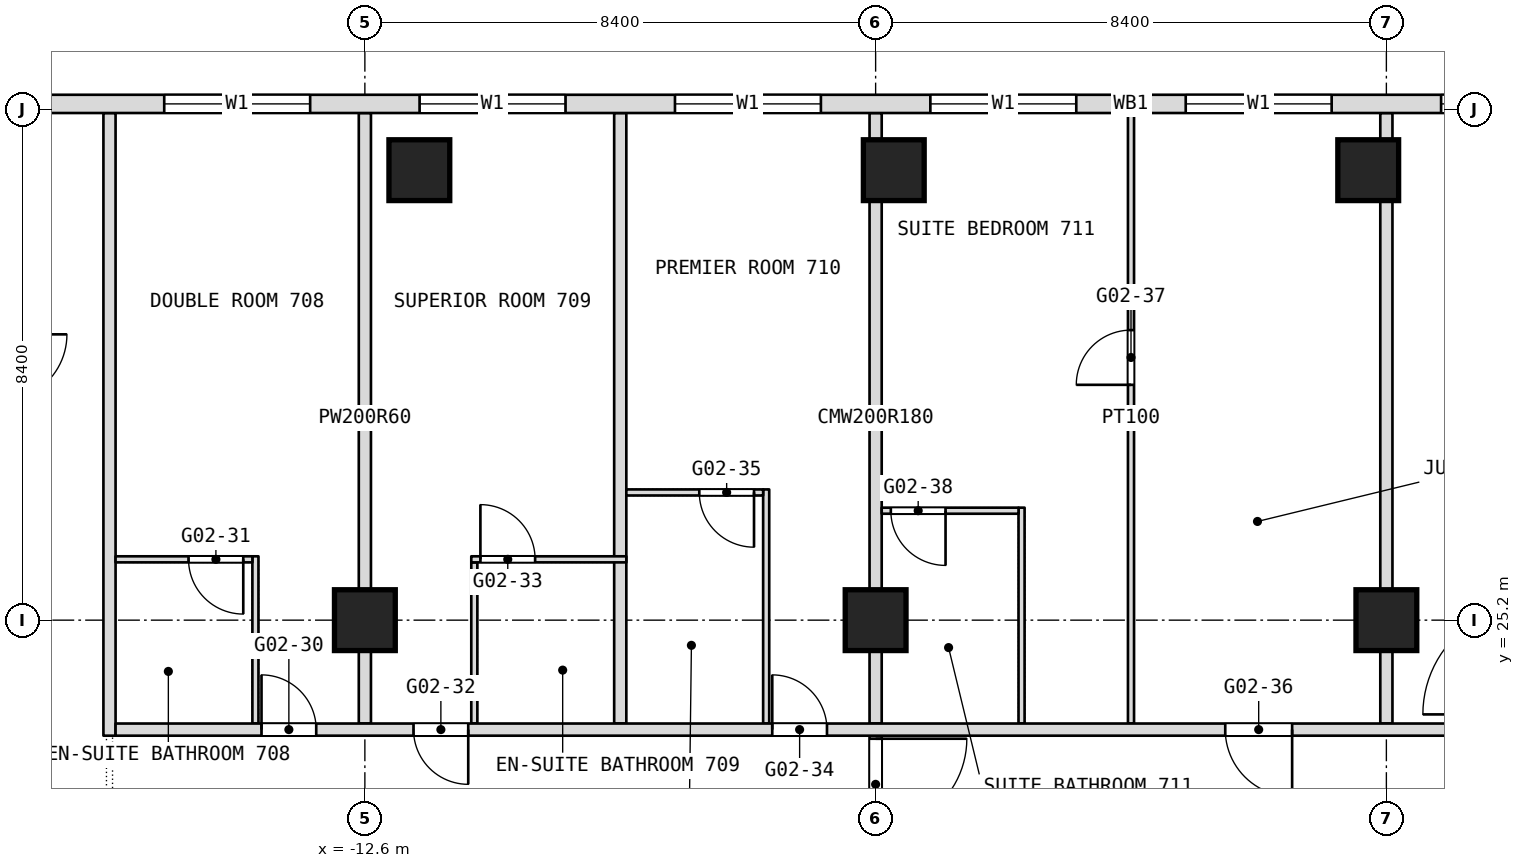
"""IFC4 building model, lengths in metres.
Left out: names, types, materials, properties, quantities, classifications, styles, units other than length and angle.
Written with IfcOpenShell. Run it as: python <this file> out.ifc"""

import sys

from ifc_helpers import new_model, si_unit, direction, frame, frame_2d, origin, origin_2d, place, context, subcontext, project, spatial, rectangle, extrude, element, fill, save


model = new_model("IFC4")
c1 = context("Model", 3, precision=1e-05, world=origin(), true_north=direction((0.0, 1.0)))
c2 = subcontext(c1, "Body", "Model", "MODEL_VIEW")
j1 = project(units=[si_unit("LENGTHUNIT", "METRE"), si_unit("PLANEANGLEUNIT", "RADIAN")], contexts=[c1])
p1 = place(None, origin())
s1 = spatial("IfcSite", under=j1, at=p1, CompositionType="ELEMENT")
p2 = place(p1, origin())
s2 = spatial("IfcBuilding", under=s1, at=p2, CompositionType="ELEMENT")
p3 = place(p2, frame((0.0, 0.0, 40.1)))
s3 = spatial("IfcBuildingStorey", under=s2, at=p3, CompositionType="ELEMENT", Elevation=40.1)
for number, where, z_axis, x_axis in (
    (1, (-12.6, 25.2, 0.0), (0.0, 0.0, 1.0), (1.0, 0.0, 0.0)),
    (2, (-4.2, 25.2, 0.0), (0.0, 0.0, 1.0), (1.0, 0.0, 0.0)),
    (3, (4.2, 25.2, 0.0), (0.0, 0.0, 1.0), (1.0, 0.0, 0.0)),
    (4, (-11.704, 32.6, 0.0), (0.0, 0.0, 1.0), (1.0, 0.0, 0.0)),
    (5, (-3.901, 32.6, 0.0), (0.0, 0.0, 1.0), (1.0, 0.0, 0.0)),
    (6, (3.901, 32.6, 0.0), (0.0, 0.0, 1.0), (1.0, 0.0, 0.0)),
):
    element("IfcColumn", number, at=place(p3, frame(where, z_axis=z_axis, x_axis=x_axis)), inside=s3, PredefinedType="COLUMN", context=c2, shape_type="SweptSolid", body=[
        extrude(rectangle(XDim=1.0, YDim=1.0, at=origin_2d()), origin(), (0.0, 0.0, 1.0), 3.6),
    ])
p4 = place(p3, frame((4.2, 23.5, 0.0), z_axis=(0.0, 0.0, 1.0), x_axis=(0.0, 1.0, 0.0)))
e7 = element("IfcWall", 7, at=p4, inside=s3, PredefinedType="PARTITIONING", context=c2, shape_type="SweptSolid", body=[
    extrude(rectangle(XDim=10.04, YDim=0.2, at=frame_2d((5.02, 0.0))), origin(), (0.0, 0.0, 1.0), 3.34),
])
p5 = place(p3, frame((0.0, 23.5, 0.0), z_axis=(0.0, 0.0, 1.0), x_axis=(0.0, 1.0, 0.0)))
e8 = element("IfcWall", 8, at=p5, inside=s3, PredefinedType="PARTITIONING", context=c2, shape_type="SweptSolid", body=[
    extrude(rectangle(XDim=10.04, YDim=0.1, at=frame_2d((5.02, 0.0))), origin(), (0.0, 0.0, 1.0), 3.34),
])
p6 = place(p5, frame((5.57, 0.0, 0.0)))
e9 = element("IfcOpeningElement", 9, at=p6, cuts=e8, PredefinedType="OPENING", context=c2, shape_type="SweptSolid", body=[
    extrude(rectangle(XDim=0.9, YDim=2.1, at=frame_2d((0.45, 1.05))), frame((0.0, 0.05, 0.0), z_axis=(0.0, -1.0, 0.0), x_axis=(1.0, 0.0, 0.0)), (0.0, 0.0, 1.0), 0.1),
])
p7 = place(p3, frame((-1.8, 23.5, 0.0), z_axis=(0.0, 0.0, 1.0), x_axis=(0.0, 1.0, 0.0)))
e10 = element("IfcWall", 10, at=p7, inside=s3, PredefinedType="PARTITIONING", context=c2, shape_type="SweptSolid", body=[
    extrude(rectangle(XDim=3.55, YDim=0.1, at=frame_2d((1.775, 0.0))), origin(), (0.0, 0.0, 1.0), 3.34),
])
p8 = place(p3, frame((-4.2, 16.8, 0.0), z_axis=(0.0, 0.0, 1.0), x_axis=(0.0, 1.0, 0.0)))
e11 = element("IfcWall", 11, at=p8, inside=s3, PredefinedType="PARTITIONING", context=c2, shape_type="SweptSolid", body=[
    extrude(rectangle(XDim=6.7, YDim=0.2, at=frame_2d((3.35, 0.0))), origin(), (0.0, 0.0, 1.0), 3.34),
])
p9 = place(p8, frame((0.15, 0.0, 0.0)))
e12 = element("IfcOpeningElement", 12, at=p9, cuts=e11, PredefinedType="OPENING", context=c2, shape_type="SweptSolid", body=[
    extrude(rectangle(XDim=1.5, YDim=2.1, at=frame_2d((0.75, 1.05))), frame((0.0, 0.1, 0.0), z_axis=(0.0, -1.0, 0.0), x_axis=(1.0, 0.0, 0.0)), (0.0, 0.0, 1.0), 0.2),
])
p10 = place(p8, frame((4.95, 0.0, 0.0)))
e13 = element("IfcOpeningElement", 13, at=p10, cuts=e11, PredefinedType="OPENING", context=c2, shape_type="SweptSolid", body=[
    extrude(rectangle(XDim=1.5, YDim=2.1, at=frame_2d((0.75, 1.05))), frame((0.0, 0.1, 0.0), z_axis=(0.0, -1.0, 0.0), x_axis=(1.0, 0.0, 0.0)), (0.0, 0.0, 1.0), 0.2),
])
p11 = place(p3, frame((-4.2, 23.5, 0.0), z_axis=(0.0, 0.0, 1.0), x_axis=(0.0, 1.0, 0.0)))
e14 = element("IfcWall", 14, at=p11, inside=s3, PredefinedType="PARTITIONING", context=c2, shape_type="SweptSolid", body=[
    extrude(rectangle(XDim=10.04, YDim=0.2, at=frame_2d((5.02, 0.0))), origin(), (0.0, 0.0, 1.0), 3.34),
])
p12 = place(p3, frame((-6.0, 23.5, 0.0), z_axis=(0.0, 0.0, 1.0), x_axis=(0.0, 1.0, 0.0)))
e15 = element("IfcWall", 15, at=p12, inside=s3, PredefinedType="PARTITIONING", context=c2, shape_type="SweptSolid", body=[
    extrude(rectangle(XDim=3.85, YDim=0.1, at=frame_2d((1.925, 0.0))), origin(), (0.0, 0.0, 1.0), 3.34),
])
p13 = place(p3, frame((-8.4, 23.5, 0.0), z_axis=(0.0, 0.0, 1.0), x_axis=(0.0, 1.0, 0.0)))
e16 = element("IfcWall", 16, at=p13, inside=s3, PredefinedType="PARTITIONING", context=c2, shape_type="SweptSolid", body=[
    extrude(rectangle(XDim=10.04, YDim=0.2, at=frame_2d((5.02, 0.0))), origin(), (0.0, 0.0, 1.0), 3.34),
])
p14 = place(p3, frame((-10.8, 23.5, 0.0), z_axis=(0.0, 0.0, 1.0), x_axis=(0.0, 1.0, 0.0)))
e17 = element("IfcWall", 17, at=p14, inside=s3, PredefinedType="PARTITIONING", context=c2, shape_type="SweptSolid", body=[
    extrude(rectangle(XDim=2.65, YDim=0.1, at=frame_2d((1.325, 0.0))), origin(), (0.0, 0.0, 1.0), 3.34),
])
p15 = place(p3, frame((-12.6, 23.5, 0.0), z_axis=(0.0, 0.0, 1.0), x_axis=(0.0, 1.0, 0.0)))
e18 = element("IfcWall", 18, at=p15, inside=s3, PredefinedType="PARTITIONING", context=c2, shape_type="SweptSolid", body=[
    extrude(rectangle(XDim=10.04, YDim=0.2, at=frame_2d((5.02, 0.0))), origin(), (0.0, 0.0, 1.0), 3.34),
])
p16 = place(p3, frame((-14.4, 23.5, 0.0), z_axis=(0.0, 0.0, 1.0), x_axis=(0.0, 1.0, 0.0)))
e19 = element("IfcWall", 19, at=p16, inside=s3, PredefinedType="PARTITIONING", context=c2, shape_type="SweptSolid", body=[
    extrude(rectangle(XDim=2.75, YDim=0.1, at=frame_2d((1.375, 0.0))), origin(), (0.0, 0.0, 1.0), 3.34),
])
p17 = place(p3, frame((-16.8, 23.3, 0.0), z_axis=(0.0, 0.0, 1.0), x_axis=(0.0, 1.0, 0.0)))
e20 = element("IfcWall", 20, at=p17, inside=s3, PredefinedType="PARTITIONING", context=c2, shape_type="SweptSolid", body=[
    extrude(rectangle(XDim=10.24, YDim=0.2, at=frame_2d((5.12, 0.0))), origin(), (0.0, 0.0, 1.0), 3.34),
])
p18 = place(p3, frame((-16.7, 23.4, 0.0), z_axis=(0.0, 0.0, 1.0), x_axis=(1.0, 0.0, 0.0)))
e21 = element("IfcWall", 21, at=p18, inside=s3, PredefinedType="PARTITIONING", context=c2, shape_type="SweptSolid", body=[
    extrude(rectangle(XDim=23.4, YDim=0.2, at=frame_2d((11.7, 0.0))), origin(), (0.0, 0.0, 1.0), 3.34),
])
p19 = place(p18, frame((2.4, 0.0, 0.0)))
e22 = element("IfcOpeningElement", 22, at=p19, cuts=e21, PredefinedType="OPENING", context=c2, shape_type="SweptSolid", body=[
    extrude(rectangle(XDim=0.9, YDim=2.1, at=frame_2d((0.45, 1.05))), frame((0.0, 0.1, 0.0), z_axis=(0.0, -1.0, 0.0), x_axis=(1.0, 0.0, 0.0)), (0.0, 0.0, 1.0), 0.2),
])
p20 = place(p18, frame((4.9, 0.0, 0.0)))
e23 = element("IfcOpeningElement", 23, at=p20, cuts=e21, PredefinedType="OPENING", context=c2, shape_type="SweptSolid", body=[
    extrude(rectangle(XDim=0.9, YDim=2.1, at=frame_2d((0.45, 1.05))), frame((0.0, 0.1, 0.0), z_axis=(0.0, -1.0, 0.0), x_axis=(1.0, 0.0, 0.0)), (0.0, 0.0, 1.0), 0.2),
])
p21 = place(p18, frame((10.8, 0.0, 0.0)))
e24 = element("IfcOpeningElement", 24, at=p21, cuts=e21, PredefinedType="OPENING", context=c2, shape_type="SweptSolid", body=[
    extrude(rectangle(XDim=0.9, YDim=2.1, at=frame_2d((0.45, 1.05))), frame((0.0, 0.1, 0.0), z_axis=(0.0, -1.0, 0.0), x_axis=(1.0, 0.0, 0.0)), (0.0, 0.0, 1.0), 0.2),
])
p22 = place(p18, frame((18.25, 0.0, 0.0)))
e25 = element("IfcOpeningElement", 25, at=p22, cuts=e21, PredefinedType="OPENING", context=c2, shape_type="SweptSolid", body=[
    extrude(rectangle(XDim=1.1, YDim=2.1, at=frame_2d((0.55, 1.05))), frame((0.0, 0.1, 0.0), z_axis=(0.0, -1.0, 0.0), x_axis=(1.0, 0.0, 0.0)), (0.0, 0.0, 1.0), 0.2),
])
p23 = place(p3, frame((-16.7, 26.2, 0.0), z_axis=(0.0, 0.0, 1.0), x_axis=(1.0, 0.0, 0.0)))
e26 = element("IfcWall", 26, at=p23, inside=s3, PredefinedType="PARTITIONING", context=c2, shape_type="SweptSolid", body=[
    extrude(rectangle(XDim=2.25, YDim=0.1, at=frame_2d((1.125, 0.0))), origin(), (0.0, 0.0, 1.0), 3.34),
])
p24 = place(p23, frame((1.2, 0.0, 0.0)))
e27 = element("IfcOpeningElement", 27, at=p24, cuts=e26, PredefinedType="OPENING", context=c2, shape_type="SweptSolid", body=[
    extrude(rectangle(XDim=0.9, YDim=2.1, at=frame_2d((0.45, 1.05))), frame((0.0, 0.05, 0.0), z_axis=(0.0, -1.0, 0.0), x_axis=(1.0, 0.0, 0.0)), (0.0, 0.0, 1.0), 0.1),
])
p25 = place(p3, frame((-10.85, 26.2, 0.0), z_axis=(0.0, 0.0, 1.0), x_axis=(1.0, 0.0, 0.0)))
e28 = element("IfcWall", 28, at=p25, inside=s3, PredefinedType="PARTITIONING", context=c2, shape_type="SweptSolid", body=[
    extrude(rectangle(XDim=2.55, YDim=0.1, at=frame_2d((1.275, 0.0))), origin(), (0.0, 0.0, 1.0), 3.34),
])
p26 = place(p25, frame((0.15, 0.0, 0.0)))
e29 = element("IfcOpeningElement", 29, at=p26, cuts=e28, PredefinedType="OPENING", context=c2, shape_type="SweptSolid", body=[
    extrude(rectangle(XDim=0.9, YDim=2.1, at=frame_2d((0.45, 1.05))), frame((0.0, 0.05, 0.0), z_axis=(0.0, -1.0, 0.0), x_axis=(1.0, 0.0, 0.0)), (0.0, 0.0, 1.0), 0.1),
])
p27 = place(p3, frame((-4.1, 27.0, 0.0), z_axis=(0.0, 0.0, 1.0), x_axis=(1.0, 0.0, 0.0)))
e30 = element("IfcWall", 30, at=p27, inside=s3, PredefinedType="PARTITIONING", context=c2, shape_type="SweptSolid", body=[
    extrude(rectangle(XDim=2.25, YDim=0.1, at=frame_2d((1.125, 0.0))), origin(), (0.0, 0.0, 1.0), 3.34),
])
p28 = place(p27, frame((0.15, 0.0, 0.0)))
e31 = element("IfcOpeningElement", 31, at=p28, cuts=e30, PredefinedType="OPENING", context=c2, shape_type="SweptSolid", body=[
    extrude(rectangle(XDim=0.9, YDim=2.1, at=frame_2d((0.45, 1.05))), frame((0.0, 0.05, 0.0), z_axis=(0.0, -1.0, 0.0), x_axis=(1.0, 0.0, 0.0)), (0.0, 0.0, 1.0), 0.1),
])
p29 = place(p3, frame((-8.3, 27.3, 0.0), z_axis=(0.0, 0.0, 1.0), x_axis=(1.0, 0.0, 0.0)))
e32 = element("IfcWall", 32, at=p29, inside=s3, PredefinedType="PARTITIONING", context=c2, shape_type="SweptSolid", body=[
    extrude(rectangle(XDim=2.25, YDim=0.1, at=frame_2d((1.125, 0.0))), origin(), (0.0, 0.0, 1.0), 3.34),
])
p30 = place(p29, frame((1.2, 0.0, 0.0)))
e33 = element("IfcOpeningElement", 33, at=p30, cuts=e32, PredefinedType="OPENING", context=c2, shape_type="SweptSolid", body=[
    extrude(rectangle(XDim=0.9, YDim=2.1, at=frame_2d((0.45, 1.05))), frame((0.0, 0.05, 0.0), z_axis=(0.0, -1.0, 0.0), x_axis=(1.0, 0.0, 0.0)), (0.0, 0.0, 1.0), 0.1),
])
p31 = place(p3, frame((23.406, 33.69, 0.0), z_axis=(0.0, 0.0, 1.0), x_axis=(-1.0, 0.0, 0.0)))
e34 = element("IfcWall", 34, at=p31, inside=s3, PredefinedType="NOTDEFINED", context=c2, shape_type="SweptSolid", body=[
    extrude(rectangle(XDim=46.812, YDim=0.3, at=frame_2d((23.406, 0.0))), origin(), (0.0, 0.0, 1.0), 3.6),
])
p32 = place(p31, frame((2.186, 0.0, 0.9)))
e35 = element("IfcOpeningElement", 35, at=p32, cuts=e34, PredefinedType="OPENING", context=c2, shape_type="SweptSolid", body=[
    extrude(rectangle(XDim=2.4, YDim=2.1, at=frame_2d((1.2, 1.05))), frame((0.0, 0.15, 0.0), z_axis=(0.0, -1.0, 0.0), x_axis=(1.0, 0.0, 0.0)), (0.0, 0.0, 1.0), 0.3),
])
p33 = place(p31, frame((7.506, 0.0, 0.9)))
e36 = element("IfcOpeningElement", 36, at=p33, cuts=e34, PredefinedType="OPENING", context=c2, shape_type="SweptSolid", body=[
    extrude(rectangle(XDim=2.4, YDim=2.1, at=frame_2d((1.2, 1.05))), frame((0.0, 0.15, 0.0), z_axis=(0.0, -1.0, 0.0), x_axis=(1.0, 0.0, 0.0)), (0.0, 0.0, 1.0), 0.3),
])
p34 = place(p31, frame((11.706, 0.0, 0.9)))
e37 = element("IfcOpeningElement", 37, at=p34, cuts=e34, PredefinedType="OPENING", context=c2, shape_type="SweptSolid", body=[
    extrude(rectangle(XDim=2.4, YDim=2.1, at=frame_2d((1.2, 1.05))), frame((0.0, 0.15, 0.0), z_axis=(0.0, -1.0, 0.0), x_axis=(1.0, 0.0, 0.0)), (0.0, 0.0, 1.0), 0.3),
])
p35 = place(p31, frame((15.906, 0.0, 0.9)))
e38 = element("IfcOpeningElement", 38, at=p35, cuts=e34, PredefinedType="OPENING", context=c2, shape_type="SweptSolid", body=[
    extrude(rectangle(XDim=2.4, YDim=2.1, at=frame_2d((1.2, 1.05))), frame((0.0, 0.15, 0.0), z_axis=(0.0, -1.0, 0.0), x_axis=(1.0, 0.0, 0.0)), (0.0, 0.0, 1.0), 0.3),
])
p36 = place(p31, frame((20.106, 0.0, 0.9)))
e39 = element("IfcOpeningElement", 39, at=p36, cuts=e34, PredefinedType="OPENING", context=c2, shape_type="SweptSolid", body=[
    extrude(rectangle(XDim=2.4, YDim=2.1, at=frame_2d((1.2, 1.05))), frame((0.0, 0.15, 0.0), z_axis=(0.0, -1.0, 0.0), x_axis=(1.0, 0.0, 0.0)), (0.0, 0.0, 1.0), 0.3),
])
p37 = place(p31, frame((24.306, 0.0, 0.9)))
e40 = element("IfcOpeningElement", 40, at=p37, cuts=e34, PredefinedType="OPENING", context=c2, shape_type="SweptSolid", body=[
    extrude(rectangle(XDim=2.4, YDim=2.1, at=frame_2d((1.2, 1.05))), frame((0.0, 0.15, 0.0), z_axis=(0.0, -1.0, 0.0), x_axis=(1.0, 0.0, 0.0)), (0.0, 0.0, 1.0), 0.3),
])
p38 = place(p31, frame((28.506, 0.0, 0.9)))
e41 = element("IfcOpeningElement", 41, at=p38, cuts=e34, PredefinedType="OPENING", context=c2, shape_type="SweptSolid", body=[
    extrude(rectangle(XDim=2.4, YDim=2.1, at=frame_2d((1.2, 1.05))), frame((0.0, 0.15, 0.0), z_axis=(0.0, -1.0, 0.0), x_axis=(1.0, 0.0, 0.0)), (0.0, 0.0, 1.0), 0.3),
])
p39 = place(p31, frame((32.706, 0.0, 0.9)))
e42 = element("IfcOpeningElement", 42, at=p39, cuts=e34, PredefinedType="OPENING", context=c2, shape_type="SweptSolid", body=[
    extrude(rectangle(XDim=2.4, YDim=2.1, at=frame_2d((1.2, 1.05))), frame((0.0, 0.15, 0.0), z_axis=(0.0, -1.0, 0.0), x_axis=(1.0, 0.0, 0.0)), (0.0, 0.0, 1.0), 0.3),
])
p40 = place(p31, frame((36.906, 0.0, 0.9)))
e43 = element("IfcOpeningElement", 43, at=p40, cuts=e34, PredefinedType="OPENING", context=c2, shape_type="SweptSolid", body=[
    extrude(rectangle(XDim=2.4, YDim=2.1, at=frame_2d((1.2, 1.05))), frame((0.0, 0.15, 0.0), z_axis=(0.0, -1.0, 0.0), x_axis=(1.0, 0.0, 0.0)), (0.0, 0.0, 1.0), 0.3),
])
p41 = place(p31, frame((42.226, 0.0, 0.9)))
e44 = element("IfcOpeningElement", 44, at=p41, cuts=e34, PredefinedType="OPENING", context=c2, shape_type="SweptSolid", body=[
    extrude(rectangle(XDim=2.4, YDim=2.1, at=frame_2d((1.2, 1.05))), frame((0.0, 0.15, 0.0), z_axis=(0.0, -1.0, 0.0), x_axis=(1.0, 0.0, 0.0)), (0.0, 0.0, 1.0), 0.3),
])
p42 = place(p6, origin())
e45 = element("IfcDoor", 45, at=p42, inside=s3, OperationType="SINGLE_SWING_LEFT", PredefinedType="DOOR", context=c2, shape_type="SweptSolid", body=[
    extrude(rectangle(XDim=0.9, YDim=2.1, at=frame_2d((0.45, 1.05))), frame((0.0, 0.025, 0.0), z_axis=(0.0, -1.0, 0.0), x_axis=(1.0, 0.0, 0.0)), (0.0, 0.0, 1.0), 0.05),
])
fill(e9, e45)
p43 = place(p19, origin())
e46 = element("IfcDoor", 46, at=p43, inside=s3, OperationType="SINGLE_SWING_LEFT", PredefinedType="DOOR", context=c2, shape_type="SweptSolid", body=[
    extrude(rectangle(XDim=0.9, YDim=2.1, at=frame_2d((0.45, 1.05))), frame((0.0, 0.025, 0.0), z_axis=(0.0, -1.0, 0.0), x_axis=(1.0, 0.0, 0.0)), (0.0, 0.0, 1.0), 0.05),
])
fill(e22, e46)
p44 = place(p20, origin())
e47 = element("IfcDoor", 47, at=p44, inside=s3, OperationType="SINGLE_SWING_RIGHT", PredefinedType="DOOR", context=c2, shape_type="SweptSolid", body=[
    extrude(rectangle(XDim=0.9, YDim=2.1, at=frame_2d((0.45, 1.05))), frame((0.0, 0.025, 0.0), z_axis=(0.0, -1.0, 0.0), x_axis=(1.0, 0.0, 0.0)), (0.0, 0.0, 1.0), 0.05),
])
fill(e23, e47)
p45 = place(p21, origin())
e48 = element("IfcDoor", 48, at=p45, inside=s3, OperationType="SINGLE_SWING_LEFT", PredefinedType="DOOR", context=c2, shape_type="SweptSolid", body=[
    extrude(rectangle(XDim=0.9, YDim=2.1, at=frame_2d((0.45, 1.05))), frame((0.0, 0.025, 0.0), z_axis=(0.0, -1.0, 0.0), x_axis=(1.0, 0.0, 0.0)), (0.0, 0.0, 1.0), 0.05),
])
fill(e24, e48)
p46 = place(p22, origin())
e49 = element("IfcDoor", 49, at=p46, inside=s3, OperationType="SINGLE_SWING_LEFT", PredefinedType="DOOR", context=c2, shape_type="SweptSolid", body=[
    extrude(rectangle(XDim=1.1, YDim=2.1, at=frame_2d((0.55, 1.05))), frame((0.0, 0.025, 0.0), z_axis=(0.0, -1.0, 0.0), x_axis=(1.0, 0.0, 0.0)), (0.0, 0.0, 1.0), 0.05),
])
fill(e25, e49)
p47 = place(p24, origin())
e50 = element("IfcDoor", 50, at=p47, inside=s3, OperationType="SINGLE_SWING_LEFT", PredefinedType="DOOR", context=c2, shape_type="SweptSolid", body=[
    extrude(rectangle(XDim=0.9, YDim=2.1, at=frame_2d((0.45, 1.05))), frame((0.0, 0.025, 0.0), z_axis=(0.0, -1.0, 0.0), x_axis=(1.0, 0.0, 0.0)), (0.0, 0.0, 1.0), 0.05),
])
fill(e27, e50)
p48 = place(p26, origin())
e51 = element("IfcDoor", 51, at=p48, inside=s3, OperationType="SINGLE_SWING_RIGHT", PredefinedType="DOOR", context=c2, shape_type="SweptSolid", body=[
    extrude(rectangle(XDim=0.9, YDim=2.1, at=frame_2d((0.45, 1.05))), frame((0.0, 0.025, 0.0), z_axis=(0.0, -1.0, 0.0), x_axis=(1.0, 0.0, 0.0)), (0.0, 0.0, 1.0), 0.05),
])
fill(e29, e51)
p49 = place(p28, origin())
e52 = element("IfcDoor", 52, at=p49, inside=s3, OperationType="SINGLE_SWING_RIGHT", PredefinedType="DOOR", context=c2, shape_type="SweptSolid", body=[
    extrude(rectangle(XDim=0.9, YDim=2.1, at=frame_2d((0.45, 1.05))), frame((0.0, 0.025, 0.0), z_axis=(0.0, -1.0, 0.0), x_axis=(1.0, 0.0, 0.0)), (0.0, 0.0, 1.0), 0.05),
])
fill(e31, e52)
p50 = place(p30, origin())
e53 = element("IfcDoor", 53, at=p50, inside=s3, OperationType="SINGLE_SWING_LEFT", PredefinedType="DOOR", context=c2, shape_type="SweptSolid", body=[
    extrude(rectangle(XDim=0.9, YDim=2.1, at=frame_2d((0.45, 1.05))), frame((0.0, 0.025, 0.0), z_axis=(0.0, -1.0, 0.0), x_axis=(1.0, 0.0, 0.0)), (0.0, 0.0, 1.0), 0.05),
])
fill(e33, e53)
p51 = place(p35, origin())
e54 = element("IfcWindow", 54, at=p51, inside=s3, PartitioningType="SINGLE_PANEL", PredefinedType="WINDOW", context=c2, shape_type="SweptSolid", body=[
    extrude(rectangle(XDim=2.4, YDim=2.1, at=frame_2d((1.2, 1.05))), frame((0.0, 0.03, 0.0), z_axis=(0.0, -1.0, 0.0), x_axis=(1.0, 0.0, 0.0)), (0.0, 0.0, 1.0), 0.06),
])
fill(e38, e54)
p52 = place(p36, origin())
e55 = element("IfcWindow", 55, at=p52, inside=s3, PartitioningType="SINGLE_PANEL", PredefinedType="WINDOW", context=c2, shape_type="SweptSolid", body=[
    extrude(rectangle(XDim=2.4, YDim=2.1, at=frame_2d((1.2, 1.05))), frame((0.0, 0.03, 0.0), z_axis=(0.0, -1.0, 0.0), x_axis=(1.0, 0.0, 0.0)), (0.0, 0.0, 1.0), 0.06),
])
fill(e39, e55)
p53 = place(p37, origin())
e56 = element("IfcWindow", 56, at=p53, inside=s3, PartitioningType="SINGLE_PANEL", PredefinedType="WINDOW", context=c2, shape_type="SweptSolid", body=[
    extrude(rectangle(XDim=2.4, YDim=2.1, at=frame_2d((1.2, 1.05))), frame((0.0, 0.03, 0.0), z_axis=(0.0, -1.0, 0.0), x_axis=(1.0, 0.0, 0.0)), (0.0, 0.0, 1.0), 0.06),
])
fill(e40, e56)
p54 = place(p38, origin())
e57 = element("IfcWindow", 57, at=p54, inside=s3, PartitioningType="SINGLE_PANEL", PredefinedType="WINDOW", context=c2, shape_type="SweptSolid", body=[
    extrude(rectangle(XDim=2.4, YDim=2.1, at=frame_2d((1.2, 1.05))), frame((0.0, 0.03, 0.0), z_axis=(0.0, -1.0, 0.0), x_axis=(1.0, 0.0, 0.0)), (0.0, 0.0, 1.0), 0.06),
])
fill(e41, e57)
p55 = place(p39, origin())
e58 = element("IfcWindow", 58, at=p55, inside=s3, PartitioningType="SINGLE_PANEL", PredefinedType="WINDOW", context=c2, shape_type="SweptSolid", body=[
    extrude(rectangle(XDim=2.4, YDim=2.1, at=frame_2d((1.2, 1.05))), frame((0.0, 0.03, 0.0), z_axis=(0.0, -1.0, 0.0), x_axis=(1.0, 0.0, 0.0)), (0.0, 0.0, 1.0), 0.06),
])
fill(e42, e58)
p56 = place(p40, origin())
e59 = element("IfcWindow", 59, at=p56, inside=s3, PartitioningType="SINGLE_PANEL", PredefinedType="WINDOW", context=c2, shape_type="SweptSolid", body=[
    extrude(rectangle(XDim=2.4, YDim=2.1, at=frame_2d((1.2, 1.05))), frame((0.0, 0.03, 0.0), z_axis=(0.0, -1.0, 0.0), x_axis=(1.0, 0.0, 0.0)), (0.0, 0.0, 1.0), 0.06),
])
fill(e43, e59)
p57 = place(p10, origin())
e60 = element("IfcDoor", 60, at=p57, inside=s3, OperationType="DOUBLE_DOOR_DOUBLE_SWING", PredefinedType="DOOR", context=c2, shape_type="SweptSolid", body=[
    extrude(rectangle(XDim=1.5, YDim=2.1, at=frame_2d((0.75, 1.05))), frame((0.0, 0.025, 0.0), z_axis=(0.0, -1.0, 0.0), x_axis=(1.0, 0.0, 0.0)), (0.0, 0.0, 1.0), 0.05),
])
fill(e13, e60)
save(model, sys.argv[1])
